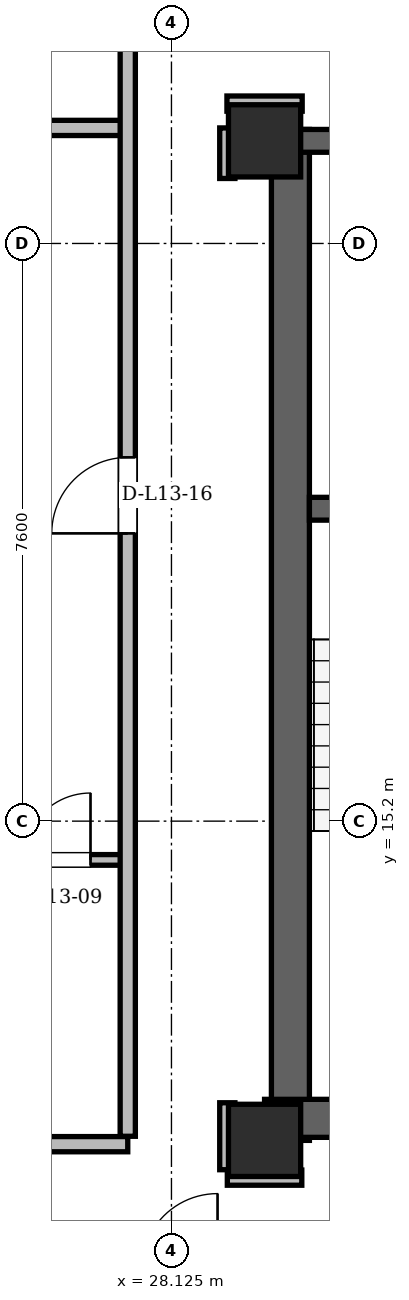
"""IFC4 building model, lengths in metres.
Left out: names, types, materials, properties, quantities, classifications, styles, units other than length and angle.
Written with IfcOpenShell. Run it as: python <this file> out.ifc"""

import sys

from ifc_helpers import new_model, si_unit, direction, frame, frame_2d, origin, origin_2d, place, context, subcontext, project, spatial, rectangle, hollow_rectangle, extrude, element, fill, save


model = new_model("IFC4")
c1 = context("Model", 3, precision=1e-05, world=origin(), true_north=direction((0.0, 1.0)))
c2 = subcontext(c1, "Body", "Model", "MODEL_VIEW")
j1 = project(units=[si_unit("LENGTHUNIT", "METRE"), si_unit("PLANEANGLEUNIT", "RADIAN")], contexts=[c1])
p1 = place(None, origin())
s1 = spatial("IfcSite", under=j1, at=p1, CompositionType="ELEMENT")
p2 = place(p1, origin())
s2 = spatial("IfcBuilding", under=s1, at=p2, CompositionType="ELEMENT")
p3 = place(p2, frame((0.0, 0.0, 52.5)))
s3 = spatial("IfcBuildingStorey", under=s2, at=p3, CompositionType="ELEMENT", Elevation=52.5)
for number, where, z_axis, x_axis in (
    (1, (29.35, 11.0, 0.0), (0.0, 0.0, 1.0), (1.0, 0.0, 0.0)),
    (2, (29.35, 24.15, 0.0), (0.0, 0.0, 1.0), (1.0, 0.0, 0.0)),
):
    element("IfcColumn", number, at=place(p3, frame(where, z_axis=z_axis, x_axis=x_axis)), inside=s3, PredefinedType="COLUMN", context=c2, shape_type="SweptSolid", body=[
        extrude(hollow_rectangle(XDim=0.95, YDim=0.95, WallThickness=0.08, at=origin_2d()), origin(), (0.0, 0.0, 1.0), 3.6),
    ])
p4 = place(p3, frame((29.69, 11.0, 0.0), z_axis=(0.0, 0.0, 1.0), x_axis=(0.0, 1.0, 0.0)))
e3 = element("IfcWall", 3, at=p4, inside=s3, PredefinedType="SHEAR", context=c2, shape_type="SweptSolid", body=[
    extrude(rectangle(XDim=13.3, YDim=0.5, at=frame_2d((6.65, 0.0))), origin(), (0.0, 0.0, 1.0), 3.36),
])
p5 = place(p3, frame((29.35, 11.29, 0.0), z_axis=(0.0, 0.0, 1.0), x_axis=(1.0, 0.0, 0.0)))
e4 = element("IfcWall", 4, at=p5, inside=s3, PredefinedType="SHEAR", context=c2, shape_type="SweptSolid", body=[
    extrude(rectangle(XDim=7.1, YDim=0.5, at=frame_2d((3.55, 0.0))), origin(), (0.0, 0.0, 1.0), 3.36),
])
p6 = place(p3, frame((29.65, 24.15, 0.0), z_axis=(0.0, 0.0, 1.0), x_axis=(1.0, 0.0, 0.0)))
e5 = element("IfcWall", 5, at=p6, inside=s3, PredefinedType="SHEAR", context=c2, shape_type="SweptSolid", body=[
    extrude(rectangle(XDim=15.7, YDim=0.3, at=frame_2d((7.85, 0.0))), origin(), (0.0, 0.0, 1.0), 3.36),
])
p7 = place(p6, frame((1.7, 0.0, 0.0)))
e6 = element("IfcOpeningElement", 6, at=p7, cuts=e5, PredefinedType="OPENING", context=c2, shape_type="SweptSolid", body=[
    extrude(rectangle(XDim=1.2, YDim=2.2, at=frame_2d((0.6, 1.1))), frame((0.0, 0.15, 0.0), z_axis=(0.0, -1.0, 0.0), x_axis=(1.0, 0.0, 0.0)), (0.0, 0.0, 1.0), 0.3),
])
p8 = place(p6, frame((12.8, 0.0, 0.0)))
e7 = element("IfcOpeningElement", 7, at=p8, cuts=e5, PredefinedType="OPENING", context=c2, shape_type="SweptSolid", body=[
    extrude(rectangle(XDim=1.2, YDim=2.2, at=frame_2d((0.6, 1.1))), frame((0.0, 0.15, 0.0), z_axis=(0.0, -1.0, 0.0), x_axis=(1.0, 0.0, 0.0)), (0.0, 0.0, 1.0), 0.3),
])
p9 = place(p6, frame((6.55, 0.0, 0.0)))
e8 = element("IfcOpeningElement", 8, at=p9, cuts=e5, PredefinedType="OPENING", context=c2, shape_type="SweptSolid", body=[
    extrude(rectangle(XDim=0.9, YDim=2.05, at=frame_2d((0.45, 1.025))), frame((0.0, 0.15, 0.0), z_axis=(0.0, -1.0, 0.0), x_axis=(1.0, 0.0, 0.0)), (0.0, 0.0, 1.0), 0.3),
])
p10 = place(p6, frame((8.45, 0.0, 0.0)))
e9 = element("IfcOpeningElement", 9, at=p10, cuts=e5, PredefinedType="OPENING", context=c2, shape_type="SweptSolid", body=[
    extrude(rectangle(XDim=0.9, YDim=2.05, at=frame_2d((0.45, 1.025))), frame((0.0, 0.15, 0.0), z_axis=(0.0, -1.0, 0.0), x_axis=(1.0, 0.0, 0.0)), (0.0, 0.0, 1.0), 0.3),
])
p11 = place(p3, frame((29.94, 19.31, 0.0), z_axis=(0.0, 0.0, 1.0), x_axis=(1.0, 0.0, 0.0)))
e10 = element("IfcWall", 10, at=p11, inside=s3, PredefinedType="SHEAR", context=c2, shape_type="SweptSolid", body=[
    extrude(rectangle(XDim=4.01, YDim=0.3, at=frame_2d((2.005, 0.0))), origin(), (0.0, 0.0, 1.0), 3.36),
])
p12 = place(p11, frame((1.01, 0.0, 0.0)))
e11 = element("IfcOpeningElement", 11, at=p12, cuts=e10, PredefinedType="OPENING", context=c2, shape_type="SweptSolid", body=[
    extrude(rectangle(XDim=1.4, YDim=2.2, at=frame_2d((0.7, 1.1))), frame((0.0, 0.15, 0.0), z_axis=(0.0, -1.0, 0.0), x_axis=(1.0, 0.0, 0.0)), (0.0, 0.0, 1.0), 0.3),
])
p13 = place(p3, frame((30.243, 43.574, 0.0), z_axis=(0.0, 0.0, 1.0), x_axis=(-0.500001264705, -0.866024673605, 0.0)))
e12 = element("IfcWall", 12, at=p13, inside=s3, PredefinedType="SOLIDWALL", context=c2, shape_type="SweptSolid", body=[
    extrude(rectangle(XDim=33.402, YDim=0.34, at=frame_2d((16.701, 0.0))), origin(), (0.0, 0.0, 1.0), 2.494),
])
p14 = place(p13, frame((7.615, 0.0, 0.0)))
e13 = element("IfcOpeningElement", 13, at=p14, cuts=e12, PredefinedType="OPENING", context=c2, shape_type="SweptSolid", body=[
    extrude(rectangle(XDim=1.5, YDim=2.2, at=frame_2d((0.75, 1.1))), frame((0.0, 0.17, 0.0), z_axis=(0.0, -1.0, 0.0), x_axis=(1.0, 0.0, 0.0)), (0.0, 0.0, 1.0), 0.34),
])
p15 = place(p13, frame((25.742, 0.0, 0.0)))
e14 = element("IfcOpeningElement", 14, at=p15, cuts=e12, PredefinedType="OPENING", context=c2, shape_type="SweptSolid", body=[
    extrude(rectangle(XDim=1.5, YDim=2.2, at=frame_2d((0.75, 1.1))), frame((0.0, 0.17, 0.0), z_axis=(0.0, -1.0, 0.0), x_axis=(1.0, 0.0, 0.0)), (0.0, 0.0, 1.0), 0.34),
])
p16 = place(p13, frame((29.807, 0.0, 0.85)))
e15 = element("IfcOpeningElement", 15, at=p16, cuts=e12, PredefinedType="OPENING", context=c2, shape_type="SweptSolid", body=[
    extrude(rectangle(XDim=2.2, YDim=1.534, at=frame_2d((1.1, 0.767))), frame((0.0, 0.17, 0.0), z_axis=(0.0, -1.0, 0.0), x_axis=(1.0, 0.0, 0.0)), (0.0, 0.0, 1.0), 0.34),
])
p17 = place(p13, frame((1.321, 0.0, 0.85)))
e16 = element("IfcOpeningElement", 16, at=p17, cuts=e12, PredefinedType="OPENING", context=c2, shape_type="SweptSolid", body=[
    extrude(rectangle(XDim=2.6, YDim=1.534, at=frame_2d((1.3, 0.767))), frame((0.0, 0.17, 0.0), z_axis=(0.0, -1.0, 0.0), x_axis=(1.0, 0.0, 0.0)), (0.0, 0.0, 1.0), 0.34),
])
p18 = place(p13, frame((16.814, 0.0, 0.85)))
e17 = element("IfcOpeningElement", 17, at=p18, cuts=e12, PredefinedType="OPENING", context=c2, shape_type="SweptSolid", body=[
    extrude(rectangle(XDim=2.0, YDim=1.534, at=frame_2d((1.0, 0.767))), frame((0.0, 0.17, 0.0), z_axis=(0.0, -1.0, 0.0), x_axis=(1.0, 0.0, 0.0)), (0.0, 0.0, 1.0), 0.34),
])
p19 = place(p3, frame((28.86, 10.51, 0.0), z_axis=(0.0, 0.0, 1.0), x_axis=(1.0, 0.0, 0.0)))
e18 = element("IfcWall", 18, at=p19, inside=s3, PredefinedType="PARTITIONING", context=c2, shape_type="SweptSolid", body=[
    extrude(rectangle(XDim=0.98, YDim=0.2, at=frame_2d((0.49, 0.0))), origin(), (0.0, 0.0, 1.0), 2.738),
])
p20 = place(p3, frame((15.878, 10.95, 0.0), z_axis=(0.0, 0.0, 1.0), x_axis=(1.0, 0.0, 0.0)))
e19 = element("IfcWall", 19, at=p20, inside=s3, PredefinedType="PARTITIONING", context=c2, shape_type="SweptSolid", body=[
    extrude(rectangle(XDim=11.672, YDim=0.2, at=frame_2d((5.836, 0.0))), origin(), (0.0, 0.0, 1.0), 3.36),
])
p21 = place(p3, frame((13.988, 14.69, 0.0), z_axis=(0.0, 0.0, 1.0), x_axis=(1.0, 0.0, 0.0)))
e20 = element("IfcWall", 20, at=p21, inside=s3, PredefinedType="PARTITIONING", context=c2, shape_type="SweptSolid", body=[
    extrude(rectangle(XDim=13.612, YDim=0.14, at=frame_2d((6.806, 0.0))), origin(), (0.0, 0.0, 1.0), 2.946),
])
p22 = place(p21, frame((3.806, 0.0, 0.0)))
e21 = element("IfcOpeningElement", 21, at=p22, cuts=e20, PredefinedType="OPENING", context=c2, shape_type="SweptSolid", body=[
    extrude(rectangle(XDim=0.92, YDim=2.12, at=frame_2d((0.46, 1.06))), frame((0.0, 0.07, 0.0), z_axis=(0.0, -1.0, 0.0), x_axis=(1.0, 0.0, 0.0)), (0.0, 0.0, 1.0), 0.14),
])
p23 = place(p21, frame((9.765, 0.0, 0.0)))
e22 = element("IfcOpeningElement", 22, at=p23, cuts=e20, PredefinedType="OPENING", context=c2, shape_type="SweptSolid", body=[
    extrude(rectangle(XDim=0.95, YDim=2.1, at=frame_2d((0.475, 1.05))), frame((0.0, 0.07, 0.0), z_axis=(0.0, -1.0, 0.0), x_axis=(1.0, 0.0, 0.0)), (0.0, 0.0, 1.0), 0.14),
])
p24 = place(p21, frame((12.192, 0.0, 0.0)))
e23 = element("IfcOpeningElement", 23, at=p24, cuts=e20, PredefinedType="OPENING", context=c2, shape_type="SweptSolid", body=[
    extrude(rectangle(XDim=0.88, YDim=2.08, at=frame_2d((0.44, 1.04))), frame((0.0, 0.07, 0.0), z_axis=(0.0, -1.0, 0.0), x_axis=(1.0, 0.0, 0.0)), (0.0, 0.0, 1.0), 0.14),
])
p25 = place(p3, frame((19.327, 24.32, 0.0), z_axis=(0.0, 0.0, 1.0), x_axis=(1.0, 0.0, 0.0)))
e24 = element("IfcWall", 24, at=p25, inside=s3, PredefinedType="PARTITIONING", context=c2, shape_type="SweptSolid", body=[
    extrude(rectangle(XDim=8.223, YDim=0.2, at=frame_2d((4.112, 0.0))), origin(), (0.0, 0.0, 1.0), 2.494),
])
p26 = place(p3, frame((28.855, 24.64, 0.0), z_axis=(0.0, 0.0, 1.0), x_axis=(1.0, 0.0, 0.0)))
e25 = element("IfcWall", 25, at=p26, inside=s3, PredefinedType="PARTITIONING", context=c2, shape_type="SweptSolid", body=[
    extrude(rectangle(XDim=0.99, YDim=0.2, at=frame_2d((0.495, 0.0))), origin(), (0.0, 0.0, 1.0), 2.738),
])
p27 = place(p3, frame((27.55, 11.054, 0.0), z_axis=(0.0, 0.0, 1.0), x_axis=(0.0, 1.0, 0.0)))
e26 = element("IfcWall", 26, at=p27, inside=s3, PredefinedType="PARTITIONING", context=c2, shape_type="SweptSolid", body=[
    extrude(rectangle(XDim=14.812, YDim=0.2, at=frame_2d((7.406, 0.0))), origin(), (0.0, 0.0, 1.0), 2.738),
])
p28 = place(p27, frame((7.932, 0.0, 0.0)))
e27 = element("IfcOpeningElement", 27, at=p28, cuts=e26, PredefinedType="OPENING", context=c2, shape_type="SweptSolid", body=[
    extrude(rectangle(XDim=1.0, YDim=2.18, at=frame_2d((0.5, 1.09))), frame((0.0, 0.1, 0.0), z_axis=(0.0, -1.0, 0.0), x_axis=(1.0, 0.0, 0.0)), (0.0, 0.0, 1.0), 0.2),
])
p29 = place(p3, frame((28.86, 10.614, 0.0), z_axis=(0.0, 0.0, 1.0), x_axis=(0.0, 1.0, 0.0)))
e28 = element("IfcWall", 28, at=p29, inside=s3, PredefinedType="PARTITIONING", context=c2, shape_type="SweptSolid", body=[
    extrude(rectangle(XDim=0.881, YDim=0.2, at=frame_2d((0.44, 0.0))), origin(), (0.0, 0.0, 1.0), 2.738),
])
p30 = place(p3, frame((28.86, 23.655, 0.0), z_axis=(0.0, 0.0, 1.0), x_axis=(0.0, 1.0, 0.0)))
e29 = element("IfcWall", 29, at=p30, inside=s3, PredefinedType="PARTITIONING", context=c2, shape_type="SweptSolid", body=[
    extrude(rectangle(XDim=0.665, YDim=0.2, at=frame_2d((0.333, 0.0))), origin(), (0.0, 0.0, 1.0), 2.946),
])
p31 = place(p24, origin())
e30 = element("IfcDoor", 30, at=p31, inside=s3, OperationType="SINGLE_SWING_RIGHT", PredefinedType="DOOR", context=c2, shape_type="SweptSolid", body=[
    extrude(rectangle(XDim=0.88, YDim=2.08, at=frame_2d((0.44, 1.04))), frame((0.0, 0.025, 0.0), z_axis=(0.0, -1.0, 0.0), x_axis=(1.0, 0.0, 0.0)), (0.0, 0.0, 1.0), 0.05),
])
fill(e23, e30)
p32 = place(p28, origin())
e31 = element("IfcDoor", 31, at=p32, inside=s3, OperationType="SINGLE_SWING_LEFT", PredefinedType="DOOR", context=c2, shape_type="SweptSolid", body=[
    extrude(rectangle(XDim=1.0, YDim=2.18, at=frame_2d((0.5, 1.09))), frame((0.0, 0.025, 0.0), z_axis=(0.0, -1.0, 0.0), x_axis=(1.0, 0.0, 0.0)), (0.0, 0.0, 1.0), 0.05),
])
fill(e27, e31)
save(model, sys.argv[1])
